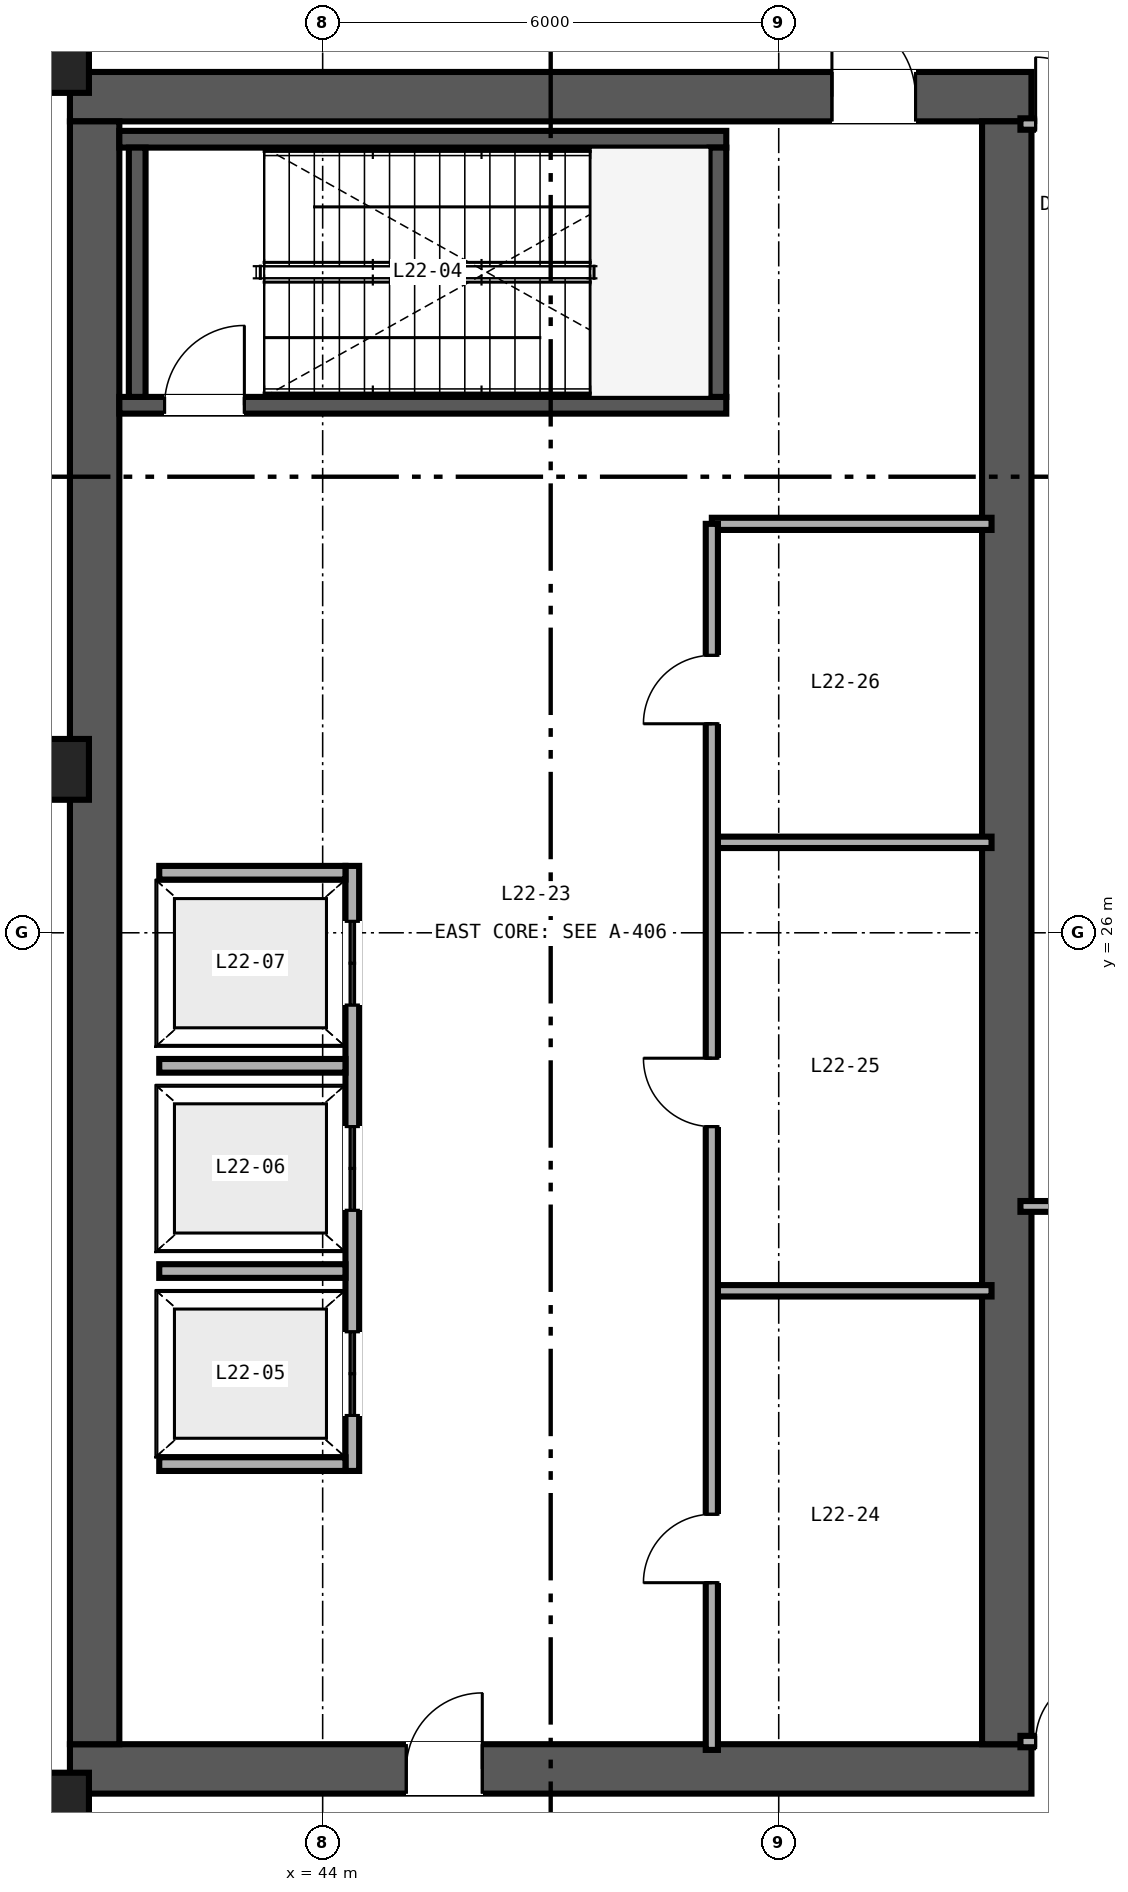
"""IFC4 building model, lengths in metres.
Left out: names, types, materials, properties, quantities, classifications, styles, units other than length and angle.
Written with IfcOpenShell. Run it as: python <this file> out.ifc"""

import sys

from ifc_helpers import new_model, si_unit, direction, frame, frame_2d, origin, origin_2d, place, context, subcontext, project, spatial, rectangle, hollow_rectangle, extrude, source, transform, mapped, element, fill, save


model = new_model("IFC4")
c1 = context("Model", 3, precision=1e-05, world=origin(), true_north=direction((0.0, 1.0)))
c2 = subcontext(c1, "Body", "Model", "MODEL_VIEW")
j1 = project(units=[si_unit("LENGTHUNIT", "METRE"), si_unit("PLANEANGLEUNIT", "RADIAN")], contexts=[c1])
p1 = place(None, origin())
s1 = spatial("IfcSite", under=j1, at=p1, CompositionType="ELEMENT")
p2 = place(p1, origin())
s2 = spatial("IfcBuilding", under=s1, at=p2, CompositionType="ELEMENT")
p3 = place(p2, frame((0.0, 0.0, 92.4)))
s3 = spatial("IfcBuildingStorey", under=s2, at=p3, CompositionType="ELEMENT", Elevation=92.4)
p4 = place(p3, frame((40.675, 15.0, 0.0), z_axis=(0.0, 0.0, 1.0), x_axis=(1.0, 0.0, 0.0)))
e1 = element("IfcWall", 1, at=p4, inside=s3, PredefinedType="SHEAR", context=c2, shape_type="SweptSolid", body=[
    extrude(rectangle(XDim=12.65, YDim=0.65, at=frame_2d((6.325, 0.0))), origin(), (0.0, 0.0, 1.0), 4.56),
])
p5 = place(p4, frame((4.425, 0.0, 0.0)))
e2 = element("IfcOpeningElement", 2, at=p5, cuts=e1, PredefinedType="OPENING", context=c2, shape_type="SweptSolid", body=[
    extrude(rectangle(XDim=1.0, YDim=2.15, at=frame_2d((0.5, 1.075))), frame((0.0, 0.335, 0.0), z_axis=(0.0, -1.0, 0.0), x_axis=(1.0, 0.0, 0.0)), (0.0, 0.0, 1.0), 0.67),
])
p6 = place(p3, frame((40.675, 37.0, 0.0), z_axis=(0.0, 0.0, 1.0), x_axis=(1.0, 0.0, 0.0)))
e3 = element("IfcWall", 3, at=p6, inside=s3, PredefinedType="SHEAR", context=c2, shape_type="SweptSolid", body=[
    extrude(rectangle(XDim=12.65, YDim=0.65, at=frame_2d((6.325, 0.0))), origin(), (0.0, 0.0, 1.0), 4.56),
])
p7 = place(p6, frame((10.025, 0.0, 0.0)))
e4 = element("IfcOpeningElement", 4, at=p7, cuts=e3, PredefinedType="OPENING", context=c2, shape_type="SweptSolid", body=[
    extrude(rectangle(XDim=1.1, YDim=2.15, at=frame_2d((0.55, 1.075))), frame((0.0, 0.335, 0.0), z_axis=(0.0, -1.0, 0.0), x_axis=(1.0, 0.0, 0.0)), (0.0, 0.0, 1.0), 0.67),
])
for number, where, z_axis, x_axis in (
    (5, (41.0, 15.325, 0.0), (0.0, 0.0, 1.0), (0.0, 1.0, 0.0)),
    (6, (53.0, 15.325, 0.0), (0.0, 0.0, 1.0), (0.0, 1.0, 0.0)),
):
    element("IfcWall", number, at=place(p3, frame(where, z_axis=z_axis, x_axis=x_axis)), inside=s3, PredefinedType="SHEAR", context=c2, shape_type="SweptSolid", body=[
        extrude(rectangle(XDim=21.35, YDim=0.65, at=frame_2d((10.675, 0.0))), origin(), (0.0, 0.0, 1.0), 4.56),
    ])
p8 = place(p3, frame((41.325, 32.94, 0.0), z_axis=(0.0, 0.0, 1.0), x_axis=(1.0, 0.0, 0.0)))
e7 = element("IfcWall", 7, at=p8, inside=s3, PredefinedType="SHEAR", context=c2, shape_type="SweptSolid", body=[
    extrude(rectangle(XDim=7.985, YDim=0.22, at=frame_2d((3.993, 0.0))), origin(), (0.0, 0.0, 1.0), 4.6),
])
p9 = place(p8, frame((0.595, 0.0, 0.0)))
e8 = element("IfcOpeningElement", 8, at=p9, cuts=e7, PredefinedType="OPENING", context=c2, shape_type="SweptSolid", body=[
    extrude(rectangle(XDim=1.05, YDim=2.15, at=frame_2d((0.525, 1.075))), frame((0.0, 0.12, 0.0), z_axis=(0.0, -1.0, 0.0), x_axis=(1.0, 0.0, 0.0)), (0.0, 0.0, 1.0), 0.24),
])
p10 = place(p3, frame((41.325, 36.44, 0.0), z_axis=(0.0, 0.0, 1.0), x_axis=(1.0, 0.0, 0.0)))
e9 = element("IfcWall", 9, at=p10, inside=s3, PredefinedType="SHEAR", context=c2, shape_type="SweptSolid", body=[
    extrude(rectangle(XDim=7.985, YDim=0.22, at=frame_2d((3.993, 0.0))), origin(), (0.0, 0.0, 1.0), 4.6),
])
for number, where, z_axis, x_axis in (
    (10, (41.56, 33.05, 0.0), (0.0, 0.0, 1.0), (0.0, 1.0, 0.0)),
    (11, (49.2, 33.05, 0.0), (0.0, 0.0, 1.0), (0.0, 1.0, 0.0)),
):
    element("IfcWall", number, at=place(p3, frame(where, z_axis=z_axis, x_axis=x_axis)), inside=s3, PredefinedType="SHEAR", context=c2, shape_type="SweptSolid", body=[
        extrude(rectangle(XDim=3.28, YDim=0.22, at=frame_2d((1.64, 0.0))), origin(), (0.0, 0.0, 1.0), 4.6),
    ])
m1 = source(origin(), c2, "Body", "SweptSolid", [
    extrude(hollow_rectangle(XDim=0.85, YDim=0.8, WallThickness=0.032, at=origin_2d()), origin(), (0.0, 0.0, 1.0), 4.56),
])
for number, where, z_axis, x_axis in (
    (12, (40.5, 14.55, 0.0), (0.0, 0.0, 1.0), (1.0, 0.0, 0.0)),
    (13, (40.5, 28.15, 0.0), (0.0, 0.0, 1.0), (1.0, 0.0, 0.0)),
    (14, (40.5, 37.45, 0.0), (0.0, 0.0, 1.0), (1.0, 0.0, 0.0)),
):
    element("IfcColumn", number, at=place(p3, frame(where, z_axis=z_axis, x_axis=x_axis)), inside=s3, PredefinedType="COLUMN", context=c2, shape_type="MappedRepresentation", body=[
        mapped(m1, transform((0.0, 0.0, 0.0), scale=1.0)),
    ])
p11 = place(p3, frame((44.39, 18.92, 0.0), z_axis=(0.0, 0.0, 1.0), x_axis=(0.0, 1.0, 0.0)))
e15 = element("IfcWall", 15, at=p11, inside=s3, PredefinedType="SOLIDWALL", context=c2, shape_type="SweptSolid", body=[
    extrude(rectangle(XDim=7.96, YDim=0.18, at=frame_2d((3.98, 0.0))), origin(), (0.0, 0.0, 1.0), 4.56),
])
p12 = place(p11, frame((0.73, 0.0, 0.0)))
e16 = element("IfcOpeningElement", 16, at=p12, cuts=e15, PredefinedType="OPENING", context=c2, shape_type="SweptSolid", body=[
    extrude(rectangle(XDim=1.1, YDim=2.2, at=frame_2d((0.55, 1.1))), frame((0.0, 0.1, 0.0), z_axis=(0.0, -1.0, 0.0), x_axis=(1.0, 0.0, 0.0)), (0.0, 0.0, 1.0), 0.2),
])
p13 = place(p11, frame((3.43, 0.0, 0.0)))
e17 = element("IfcOpeningElement", 17, at=p13, cuts=e15, PredefinedType="OPENING", context=c2, shape_type="SweptSolid", body=[
    extrude(rectangle(XDim=1.1, YDim=2.2, at=frame_2d((0.55, 1.1))), frame((0.0, 0.1, 0.0), z_axis=(0.0, -1.0, 0.0), x_axis=(1.0, 0.0, 0.0)), (0.0, 0.0, 1.0), 0.2),
])
p14 = place(p11, frame((6.13, 0.0, 0.0)))
e18 = element("IfcOpeningElement", 18, at=p14, cuts=e15, PredefinedType="OPENING", context=c2, shape_type="SweptSolid", body=[
    extrude(rectangle(XDim=1.1, YDim=2.2, at=frame_2d((0.55, 1.1))), frame((0.0, 0.1, 0.0), z_axis=(0.0, -1.0, 0.0), x_axis=(1.0, 0.0, 0.0)), (0.0, 0.0, 1.0), 0.2),
])
for number, where, z_axis, x_axis in (
    (19, (41.85, 19.01, 0.0), (0.0, 0.0, 1.0), (1.0, 0.0, 0.0)),
    (20, (41.85, 26.79, 0.0), (0.0, 0.0, 1.0), (1.0, 0.0, 0.0)),
    (21, (41.85, 21.55, 0.0), (0.0, 0.0, 1.0), (1.0, 0.0, 0.0)),
    (22, (41.85, 24.25, 0.0), (0.0, 0.0, 1.0), (1.0, 0.0, 0.0)),
):
    element("IfcWall", number, at=place(p3, frame(where, z_axis=z_axis, x_axis=x_axis)), inside=s3, PredefinedType="SOLIDWALL", context=c2, shape_type="SweptSolid", body=[
        extrude(rectangle(XDim=2.45, YDim=0.18, at=frame_2d((1.225, 0.0))), origin(), (0.0, 0.0, 1.0), 4.56),
    ])
p15 = place(p3, frame((49.12, 31.38, 0.0), z_axis=(0.0, 0.0, 1.0), x_axis=(1.0, 0.0, 0.0)))
e23 = element("IfcWall", 23, at=p15, inside=s3, PredefinedType="PARTITIONING", context=c2, shape_type="SweptSolid", body=[
    extrude(rectangle(XDim=3.68, YDim=0.16, at=frame_2d((1.84, 0.0))), origin(), (0.0, 0.0, 1.0), 3.46),
])
for number, where, z_axis, x_axis in (
    (24, (49.12, 21.29, 0.0), (0.0, 0.0, 1.0), (1.0, 0.0, 0.0)),
    (25, (49.12, 27.19, 0.0), (0.0, 0.0, 1.0), (1.0, 0.0, 0.0)),
):
    element("IfcWall", number, at=place(p3, frame(where, z_axis=z_axis, x_axis=x_axis)), inside=s3, PredefinedType="PARTITIONING", context=c2, shape_type="SweptSolid", body=[
        extrude(rectangle(XDim=3.68, YDim=0.15, at=frame_2d((1.84, 0.0))), origin(), (0.0, 0.0, 1.0), 4.56),
    ])
p16 = place(p3, frame((49.12, 15.25, 0.0), z_axis=(0.0, 0.0, 1.0), x_axis=(0.0, 1.0, 0.0)))
e26 = element("IfcWall", 26, at=p16, inside=s3, PredefinedType="PARTITIONING", context=c2, shape_type="SweptSolid", body=[
    extrude(rectangle(XDim=16.13, YDim=0.16, at=frame_2d((8.065, 0.0))), origin(), (0.0, 0.0, 1.0), 3.46),
])
p17 = place(p16, frame((2.2, 0.0, 0.0)))
e27 = element("IfcOpeningElement", 27, at=p17, cuts=e26, PredefinedType="OPENING", context=c2, shape_type="SweptSolid", body=[
    extrude(rectangle(XDim=0.9, YDim=2.15, at=frame_2d((0.45, 1.075))), frame((0.0, 0.09, 0.0), z_axis=(0.0, -1.0, 0.0), x_axis=(1.0, 0.0, 0.0)), (0.0, 0.0, 1.0), 0.18),
])
p18 = place(p16, frame((8.2, 0.0, 0.0)))
e28 = element("IfcOpeningElement", 28, at=p18, cuts=e26, PredefinedType="OPENING", context=c2, shape_type="SweptSolid", body=[
    extrude(rectangle(XDim=0.9, YDim=2.15, at=frame_2d((0.45, 1.075))), frame((0.0, 0.09, 0.0), z_axis=(0.0, -1.0, 0.0), x_axis=(1.0, 0.0, 0.0)), (0.0, 0.0, 1.0), 0.18),
])
p19 = place(p16, frame((13.5, 0.0, 0.0)))
e29 = element("IfcOpeningElement", 29, at=p19, cuts=e26, PredefinedType="OPENING", context=c2, shape_type="SweptSolid", body=[
    extrude(rectangle(XDim=0.9, YDim=2.15, at=frame_2d((0.45, 1.075))), frame((0.0, 0.09, 0.0), z_axis=(0.0, -1.0, 0.0), x_axis=(1.0, 0.0, 0.0)), (0.0, 0.0, 1.0), 0.18),
])
p20 = place(p3, frame((53.18, 15.36, 0.0), z_axis=(0.0, 0.0, 1.0), x_axis=(1.0, 0.0, 0.0)))
e30 = element("IfcWall", 30, at=p20, inside=s3, PredefinedType="PARTITIONING", context=c2, shape_type="SweptSolid", body=[
    extrude(rectangle(XDim=2.66, YDim=0.15, at=frame_2d((1.33, 0.0))), origin(), (0.0, 0.0, 1.0), 3.781),
])
p21 = place(p20, frame((0.2, 0.0, 0.0)))
e31 = element("IfcOpeningElement", 31, at=p21, cuts=e30, PredefinedType="OPENING", context=c2, shape_type="SweptSolid", body=[
    extrude(rectangle(XDim=0.88, YDim=2.15, at=frame_2d((0.44, 1.075))), frame((0.0, 0.085, 0.0), z_axis=(0.0, -1.0, 0.0), x_axis=(1.0, 0.0, 0.0)), (0.0, 0.0, 1.0), 0.17),
])
p22 = place(p3, frame((53.18, 36.64, 0.0), z_axis=(0.0, 0.0, 1.0), x_axis=(1.0, 0.0, 0.0)))
e32 = element("IfcWall", 32, at=p22, inside=s3, PredefinedType="PARTITIONING", context=c2, shape_type="SweptSolid", body=[
    extrude(rectangle(XDim=2.66, YDim=0.15, at=frame_2d((1.33, 0.0))), origin(), (0.0, 0.0, 1.0), 3.943),
])
p23 = place(p22, frame((0.2, 0.0, 0.0)))
e33 = element("IfcOpeningElement", 33, at=p23, cuts=e32, PredefinedType="OPENING", context=c2, shape_type="SweptSolid", body=[
    extrude(rectangle(XDim=0.88, YDim=2.15, at=frame_2d((0.44, 1.075))), frame((0.0, 0.085, 0.0), z_axis=(0.0, -1.0, 0.0), x_axis=(1.0, 0.0, 0.0)), (0.0, 0.0, 1.0), 0.17),
])
p24 = place(p3, frame((53.18, 22.4, 0.0), z_axis=(0.0, 0.0, 1.0), x_axis=(1.0, 0.0, 0.0)))
e34 = element("IfcWall", 34, at=p24, inside=s3, PredefinedType="PARTITIONING", context=c2, shape_type="SweptSolid", body=[
    extrude(rectangle(XDim=2.66, YDim=0.142, at=frame_2d((1.33, 0.0))), origin(), (0.0, 0.0, 1.0), 3.781),
])
m2 = source(origin(), c2, "Body", "SweptSolid", [
    extrude(rectangle(XDim=1.05, YDim=2.15, at=frame_2d((0.525, 1.075))), frame((0.0, 0.025, 0.0), z_axis=(0.0, -1.0, 0.0), x_axis=(1.0, 0.0, 0.0)), (0.0, 0.0, 1.0), 0.05),
])
p25 = place(p9, origin())
e35 = element("IfcDoor", 35, at=p25, inside=s3, OperationType="SINGLE_SWING_RIGHT", PredefinedType="DOOR", context=c2, shape_type="MappedRepresentation", body=[
    mapped(m2, transform((0.0, 0.0, 0.0), scale=1.0)),
])
fill(e8, e35)
m3 = source(origin(), c2, "Body", "SweptSolid", [
    extrude(rectangle(XDim=1.1, YDim=2.2, at=frame_2d((0.55, 1.1))), frame((0.0, 0.025, 0.0), z_axis=(0.0, -1.0, 0.0), x_axis=(1.0, 0.0, 0.0)), (0.0, 0.0, 1.0), 0.05),
])
p26 = place(p12, origin())
e36 = element("IfcDoor", 36, at=p26, inside=s3, OperationType="DOUBLE_DOOR_SLIDING", PredefinedType="DOOR", context=c2, shape_type="MappedRepresentation", body=[
    mapped(m3, transform((0.0, 0.0, 0.0), scale=1.0)),
])
fill(e16, e36)
p27 = place(p13, origin())
e37 = element("IfcDoor", 37, at=p27, inside=s3, OperationType="DOUBLE_DOOR_SLIDING", PredefinedType="DOOR", context=c2, shape_type="MappedRepresentation", body=[
    mapped(m3, transform((0.0, 0.0, 0.0), scale=1.0)),
])
fill(e17, e37)
p28 = place(p14, origin())
e38 = element("IfcDoor", 38, at=p28, inside=s3, OperationType="DOUBLE_DOOR_SLIDING", PredefinedType="DOOR", context=c2, shape_type="MappedRepresentation", body=[
    mapped(m3, transform((0.0, 0.0, 0.0), scale=1.0)),
])
fill(e18, e38)
m4 = source(origin(), c2, "Body", "SweptSolid", [
    extrude(rectangle(XDim=1.0, YDim=2.15, at=frame_2d((0.5, 1.075))), frame((0.0, 0.025, 0.0), z_axis=(0.0, -1.0, 0.0), x_axis=(1.0, 0.0, 0.0)), (0.0, 0.0, 1.0), 0.05),
])
p29 = place(p5, origin())
e39 = element("IfcDoor", 39, at=p29, inside=s3, OperationType="SINGLE_SWING_RIGHT", PredefinedType="DOOR", context=c2, shape_type="MappedRepresentation", body=[
    mapped(m4, transform((0.0, 0.0, 0.0), scale=1.0)),
])
fill(e2, e39)
m5 = source(origin(), c2, "Body", "SweptSolid", [
    extrude(rectangle(XDim=1.1, YDim=2.15, at=frame_2d((0.55, 1.075))), frame((0.0, 0.025, 0.0), z_axis=(0.0, -1.0, 0.0), x_axis=(1.0, 0.0, 0.0)), (0.0, 0.0, 1.0), 0.05),
])
p30 = place(p7, origin())
e40 = element("IfcDoor", 40, at=p30, inside=s3, OperationType="SINGLE_SWING_LEFT", PredefinedType="DOOR", context=c2, shape_type="MappedRepresentation", body=[
    mapped(m5, transform((0.0, 0.0, 0.0), scale=1.0)),
])
fill(e4, e40)
m6 = source(origin(), c2, "Body", "SweptSolid", [
    extrude(rectangle(XDim=0.9, YDim=2.15, at=frame_2d((0.45, 1.075))), frame((0.0, 0.025, 0.0), z_axis=(0.0, -1.0, 0.0), x_axis=(1.0, 0.0, 0.0)), (0.0, 0.0, 1.0), 0.05),
])
p31 = place(p17, origin())
e41 = element("IfcDoor", 41, at=p31, inside=s3, OperationType="SINGLE_SWING_LEFT", PredefinedType="DOOR", context=c2, shape_type="MappedRepresentation", body=[
    mapped(m6, transform((0.0, 0.0, 0.0), scale=1.0)),
])
fill(e27, e41)
p32 = place(p18, origin())
e42 = element("IfcDoor", 42, at=p32, inside=s3, OperationType="SINGLE_SWING_RIGHT", PredefinedType="DOOR", context=c2, shape_type="MappedRepresentation", body=[
    mapped(m6, transform((0.0, 0.0, 0.0), scale=1.0)),
])
fill(e28, e42)
p33 = place(p19, origin())
e43 = element("IfcDoor", 43, at=p33, inside=s3, OperationType="SINGLE_SWING_LEFT", PredefinedType="DOOR", context=c2, shape_type="MappedRepresentation", body=[
    mapped(m6, transform((0.0, 0.0, 0.0), scale=1.0)),
])
fill(e29, e43)
m7 = source(origin(), c2, "Body", "SweptSolid", [
    extrude(rectangle(XDim=0.88, YDim=2.15, at=frame_2d((0.44, 1.075))), frame((0.0, 0.025, 0.0), z_axis=(0.0, -1.0, 0.0), x_axis=(1.0, 0.0, 0.0)), (0.0, 0.0, 1.0), 0.05),
])
p34 = place(p21, origin())
e44 = element("IfcDoor", 44, at=p34, inside=s3, OperationType="SINGLE_SWING_RIGHT", PredefinedType="DOOR", context=c2, shape_type="MappedRepresentation", body=[
    mapped(m7, transform((0.0, 0.0, 0.0), scale=1.0)),
])
fill(e31, e44)
p35 = place(p23, origin())
e45 = element("IfcDoor", 45, at=p35, inside=s3, OperationType="SINGLE_SWING_LEFT", PredefinedType="DOOR", context=c2, shape_type="MappedRepresentation", body=[
    mapped(m7, transform((0.0, 0.0, 0.0), scale=1.0)),
])
fill(e33, e45)
save(model, sys.argv[1])
